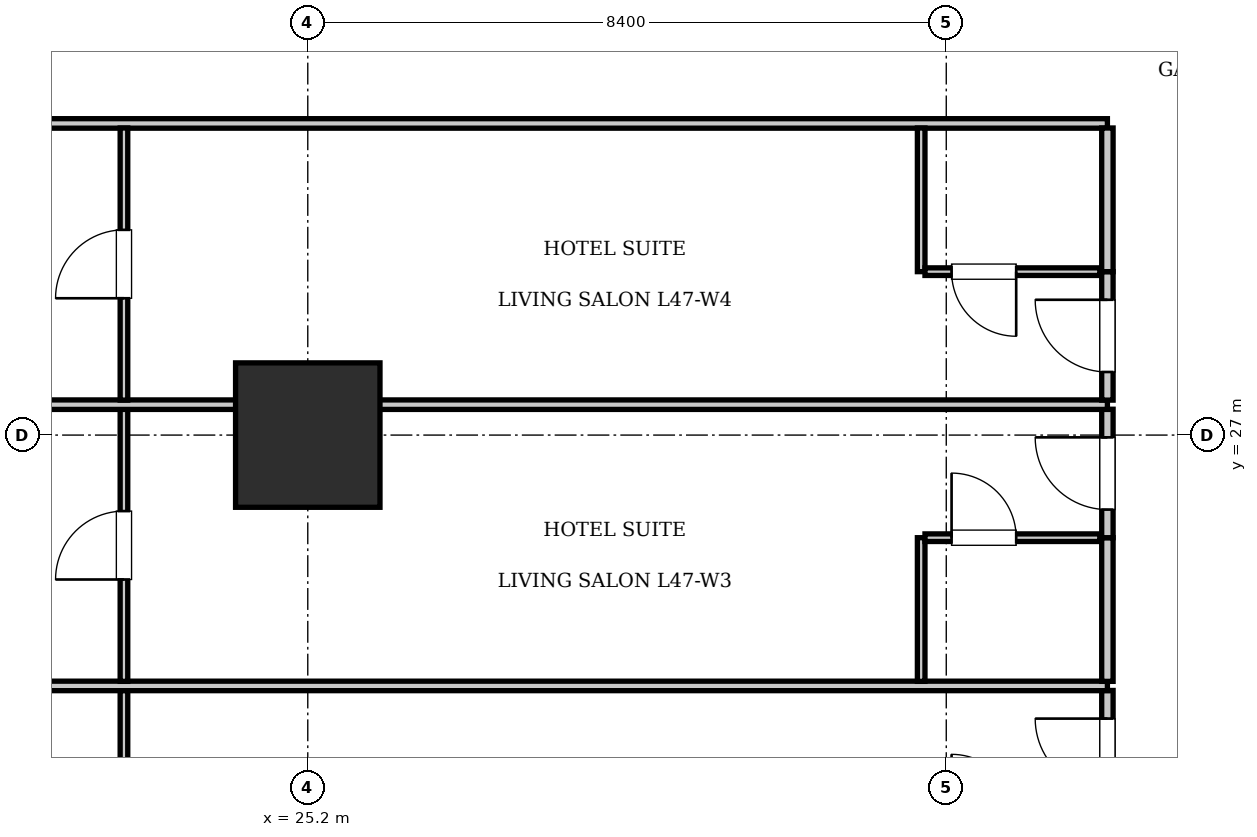
"""IFC4 building model, lengths in metres.
Left out: names, types, materials, properties, quantities, classifications, styles, units other than length and angle.
Written with IfcOpenShell. Run it as: python <this file> out.ifc"""

import sys

from ifc_helpers import new_model, si_unit, direction, frame, frame_2d, origin, origin_2d, place, context, subcontext, project, spatial, rectangle, extrude, element, fill, save


model = new_model("IFC4")
c1 = context("Model", 3, precision=1e-05, world=origin(), true_north=direction((0.0, 1.0)))
c2 = subcontext(c1, "Body", "Model", "MODEL_VIEW")
j1 = project(units=[si_unit("LENGTHUNIT", "METRE"), si_unit("PLANEANGLEUNIT", "RADIAN")], contexts=[c1])
p1 = place(None, origin())
s1 = spatial("IfcSite", under=j1, at=p1, CompositionType="ELEMENT")
p2 = place(p1, origin())
s2 = spatial("IfcBuilding", under=s1, at=p2, CompositionType="ELEMENT")
p3 = place(p2, frame((0.0, 0.0, 192.85)))
s3 = spatial("IfcBuildingStorey", under=s2, at=p3, CompositionType="ELEMENT", Elevation=192.85)
p4 = place(p3, frame((25.2, 27.0, 0.0), z_axis=(0.0, 0.0, 1.0), x_axis=(1.0, 0.0, 0.0)))
e1 = element("IfcColumn", 1, at=p4, inside=s3, PredefinedType="COLUMN", context=c2, shape_type="SweptSolid", body=[
    extrude(rectangle(XDim=1.9, YDim=1.9, at=origin_2d()), origin(), (0.0, 0.0, 1.0), 3.85),
])
p5 = place(p3, frame((13.2, 31.1, 0.0), z_axis=(0.0, 0.0, 1.0), x_axis=(1.0, 0.0, 0.0)))
e2 = element("IfcWall", 2, at=p5, inside=s3, PredefinedType="PARTITIONING", context=c2, shape_type="SweptSolid", body=[
    extrude(rectangle(XDim=22.52, YDim=0.125, at=frame_2d((11.26, 0.0))), origin(), (0.0, 0.0, 1.0), 3.61),
])
p6 = place(p3, frame((35.72, 21.95, 0.0), z_axis=(0.0, 0.0, 1.0), x_axis=(0.0, 1.0, 0.0)))
e3 = element("IfcWall", 3, at=p6, inside=s3, PredefinedType="PARTITIONING", context=c2, shape_type="SweptSolid", body=[
    extrude(rectangle(XDim=1.69, YDim=0.15, at=frame_2d((0.845, 0.0))), origin(), (0.0, 0.0, 1.0), 3.61),
])
p7 = place(p6, frame((0.37, 0.0, 0.0)))
e4 = element("IfcOpeningElement", 4, at=p7, cuts=e3, PredefinedType="OPENING", context=c2, shape_type="SweptSolid", body=[
    extrude(rectangle(XDim=0.95, YDim=2.15, at=frame_2d((0.475, 1.075))), frame((0.0, 0.085, 0.0), z_axis=(0.0, -1.0, 0.0), x_axis=(1.0, 0.0, 0.0)), (0.0, 0.0, 1.0), 0.17),
])
p8 = place(p3, frame((22.781, 20.06, 0.0), z_axis=(0.0, 0.0, 1.0), x_axis=(0.0, 1.0, 0.0)))
e5 = element("IfcWall", 5, at=p8, inside=s3, PredefinedType="PARTITIONING", context=c2, shape_type="SweptSolid", body=[
    extrude(rectangle(XDim=3.58, YDim=0.1, at=frame_2d((1.79, 0.0))), origin(), (0.0, 0.0, 1.0), 3.61),
])
p9 = place(p8, frame((1.34, 0.0, 0.0)))
e6 = element("IfcOpeningElement", 6, at=p9, cuts=e5, PredefinedType="OPENING", context=c2, shape_type="SweptSolid", body=[
    extrude(rectangle(XDim=0.9, YDim=2.1, at=frame_2d((0.45, 1.05))), frame((0.0, 0.06, 0.0), z_axis=(0.0, -1.0, 0.0), x_axis=(1.0, 0.0, 0.0)), (0.0, 0.0, 1.0), 0.12),
])
p10 = place(p3, frame((13.2, 23.7, 0.0), z_axis=(0.0, 0.0, 1.0), x_axis=(1.0, 0.0, 0.0)))
e7 = element("IfcWall", 7, at=p10, inside=s3, PredefinedType="PARTITIONING", context=c2, shape_type="SweptSolid", body=[
    extrude(rectangle(XDim=22.52, YDim=0.125, at=frame_2d((11.26, 0.0))), origin(), (0.0, 0.0, 1.0), 3.61),
])
p11 = place(p3, frame((35.72, 23.76, 0.0), z_axis=(0.0, 0.0, 1.0), x_axis=(0.0, 1.0, 0.0)))
e8 = element("IfcWall", 8, at=p11, inside=s3, PredefinedType="PARTITIONING", context=c2, shape_type="SweptSolid", body=[
    extrude(rectangle(XDim=1.89, YDim=0.15, at=frame_2d((0.945, 0.0))), origin(), (0.0, 0.0, 1.0), 3.61),
])
p12 = place(p3, frame((35.72, 25.65, 0.0), z_axis=(0.0, 0.0, 1.0), x_axis=(0.0, 1.0, 0.0)))
e9 = element("IfcWall", 9, at=p12, inside=s3, PredefinedType="PARTITIONING", context=c2, shape_type="SweptSolid", body=[
    extrude(rectangle(XDim=1.69, YDim=0.15, at=frame_2d((0.845, 0.0))), origin(), (0.0, 0.0, 1.0), 3.61),
])
p13 = place(p12, frame((0.37, 0.0, 0.0)))
e10 = element("IfcOpeningElement", 10, at=p13, cuts=e9, PredefinedType="OPENING", context=c2, shape_type="SweptSolid", body=[
    extrude(rectangle(XDim=0.95, YDim=2.15, at=frame_2d((0.475, 1.075))), frame((0.0, 0.085, 0.0), z_axis=(0.0, -1.0, 0.0), x_axis=(1.0, 0.0, 0.0)), (0.0, 0.0, 1.0), 0.17),
])
p14 = place(p3, frame((33.27, 23.76, 0.0), z_axis=(0.0, 0.0, 1.0), x_axis=(0.0, 1.0, 0.0)))
e11 = element("IfcWall", 11, at=p14, inside=s3, PredefinedType="PARTITIONING", context=c2, shape_type="SweptSolid", body=[
    extrude(rectangle(XDim=1.89, YDim=0.1, at=frame_2d((0.945, 0.0))), origin(), (0.0, 0.0, 1.0), 3.61),
])
p15 = place(p3, frame((33.32, 25.65, 0.0), z_axis=(0.0, 0.0, 1.0), x_axis=(1.0, 0.0, 0.0)))
e12 = element("IfcWall", 12, at=p15, inside=s3, PredefinedType="PARTITIONING", context=c2, shape_type="SweptSolid", body=[
    extrude(rectangle(XDim=2.3, YDim=0.1, at=frame_2d((1.15, 0.0))), origin(), (0.0, 0.0, 1.0), 3.61),
])
p16 = place(p15, frame((0.35, 0.0, 0.0)))
e13 = element("IfcOpeningElement", 13, at=p16, cuts=e12, PredefinedType="OPENING", context=c2, shape_type="SweptSolid", body=[
    extrude(rectangle(XDim=0.85, YDim=2.1, at=frame_2d((0.425, 1.05))), frame((0.0, 0.06, 0.0), z_axis=(0.0, -1.0, 0.0), x_axis=(1.0, 0.0, 0.0)), (0.0, 0.0, 1.0), 0.12),
])
p17 = place(p3, frame((22.781, 23.76, 0.0), z_axis=(0.0, 0.0, 1.0), x_axis=(0.0, 1.0, 0.0)))
e14 = element("IfcWall", 14, at=p17, inside=s3, PredefinedType="PARTITIONING", context=c2, shape_type="SweptSolid", body=[
    extrude(rectangle(XDim=3.58, YDim=0.1, at=frame_2d((1.79, 0.0))), origin(), (0.0, 0.0, 1.0), 3.61),
])
p18 = place(p17, frame((1.34, 0.0, 0.0)))
e15 = element("IfcOpeningElement", 15, at=p18, cuts=e14, PredefinedType="OPENING", context=c2, shape_type="SweptSolid", body=[
    extrude(rectangle(XDim=0.9, YDim=2.1, at=frame_2d((0.45, 1.05))), frame((0.0, 0.06, 0.0), z_axis=(0.0, -1.0, 0.0), x_axis=(1.0, 0.0, 0.0)), (0.0, 0.0, 1.0), 0.12),
])
p19 = place(p3, frame((13.2, 27.4, 0.0), z_axis=(0.0, 0.0, 1.0), x_axis=(1.0, 0.0, 0.0)))
e16 = element("IfcWall", 16, at=p19, inside=s3, PredefinedType="PARTITIONING", context=c2, shape_type="SweptSolid", body=[
    extrude(rectangle(XDim=22.52, YDim=0.125, at=frame_2d((11.26, 0.0))), origin(), (0.0, 0.0, 1.0), 3.61),
])
p20 = place(p3, frame((35.72, 27.46, 0.0), z_axis=(0.0, 0.0, 1.0), x_axis=(0.0, 1.0, 0.0)))
e17 = element("IfcWall", 17, at=p20, inside=s3, PredefinedType="PARTITIONING", context=c2, shape_type="SweptSolid", body=[
    extrude(rectangle(XDim=1.69, YDim=0.15, at=frame_2d((0.845, 0.0))), origin(), (0.0, 0.0, 1.0), 3.61),
])
p21 = place(p20, frame((0.37, 0.0, 0.0)))
e18 = element("IfcOpeningElement", 18, at=p21, cuts=e17, PredefinedType="OPENING", context=c2, shape_type="SweptSolid", body=[
    extrude(rectangle(XDim=0.95, YDim=2.15, at=frame_2d((0.475, 1.075))), frame((0.0, 0.085, 0.0), z_axis=(0.0, -1.0, 0.0), x_axis=(1.0, 0.0, 0.0)), (0.0, 0.0, 1.0), 0.17),
])
p22 = place(p3, frame((35.72, 29.15, 0.0), z_axis=(0.0, 0.0, 1.0), x_axis=(0.0, 1.0, 0.0)))
e19 = element("IfcWall", 19, at=p22, inside=s3, PredefinedType="PARTITIONING", context=c2, shape_type="SweptSolid", body=[
    extrude(rectangle(XDim=1.89, YDim=0.15, at=frame_2d((0.945, 0.0))), origin(), (0.0, 0.0, 1.0), 3.61),
])
p23 = place(p3, frame((33.27, 29.15, 0.0), z_axis=(0.0, 0.0, 1.0), x_axis=(0.0, 1.0, 0.0)))
e20 = element("IfcWall", 20, at=p23, inside=s3, PredefinedType="PARTITIONING", context=c2, shape_type="SweptSolid", body=[
    extrude(rectangle(XDim=1.89, YDim=0.1, at=frame_2d((0.945, 0.0))), origin(), (0.0, 0.0, 1.0), 3.61),
])
p24 = place(p3, frame((33.32, 29.15, 0.0), z_axis=(0.0, 0.0, 1.0), x_axis=(1.0, 0.0, 0.0)))
e21 = element("IfcWall", 21, at=p24, inside=s3, PredefinedType="PARTITIONING", context=c2, shape_type="SweptSolid", body=[
    extrude(rectangle(XDim=2.3, YDim=0.1, at=frame_2d((1.15, 0.0))), origin(), (0.0, 0.0, 1.0), 3.61),
])
p25 = place(p24, frame((0.35, 0.0, 0.0)))
e22 = element("IfcOpeningElement", 22, at=p25, cuts=e21, PredefinedType="OPENING", context=c2, shape_type="SweptSolid", body=[
    extrude(rectangle(XDim=0.85, YDim=2.1, at=frame_2d((0.425, 1.05))), frame((0.0, 0.06, 0.0), z_axis=(0.0, -1.0, 0.0), x_axis=(1.0, 0.0, 0.0)), (0.0, 0.0, 1.0), 0.12),
])
p26 = place(p3, frame((22.781, 27.46, 0.0), z_axis=(0.0, 0.0, 1.0), x_axis=(0.0, 1.0, 0.0)))
e23 = element("IfcWall", 23, at=p26, inside=s3, PredefinedType="PARTITIONING", context=c2, shape_type="SweptSolid", body=[
    extrude(rectangle(XDim=3.58, YDim=0.1, at=frame_2d((1.79, 0.0))), origin(), (0.0, 0.0, 1.0), 3.61),
])
p27 = place(p26, frame((1.34, 0.0, 0.0)))
e24 = element("IfcOpeningElement", 24, at=p27, cuts=e23, PredefinedType="OPENING", context=c2, shape_type="SweptSolid", body=[
    extrude(rectangle(XDim=0.9, YDim=2.1, at=frame_2d((0.45, 1.05))), frame((0.0, 0.06, 0.0), z_axis=(0.0, -1.0, 0.0), x_axis=(1.0, 0.0, 0.0)), (0.0, 0.0, 1.0), 0.12),
])
p28 = place(p7, origin())
e25 = element("IfcDoor", 25, at=p28, inside=s3, OperationType="SINGLE_SWING_RIGHT", PredefinedType="DOOR", context=c2, shape_type="SweptSolid", body=[
    extrude(rectangle(XDim=0.95, YDim=2.15, at=frame_2d((0.475, 1.075))), frame((0.0, 0.025, 0.0), z_axis=(0.0, -1.0, 0.0), x_axis=(1.0, 0.0, 0.0)), (0.0, 0.0, 1.0), 0.05),
])
fill(e4, e25)
p29 = place(p16, origin())
e26 = element("IfcDoor", 26, at=p29, inside=s3, OperationType="SINGLE_SWING_LEFT", PredefinedType="DOOR", context=c2, shape_type="SweptSolid", body=[
    extrude(rectangle(XDim=0.85, YDim=2.1, at=frame_2d((0.425, 1.05))), frame((0.0, 0.025, 0.0), z_axis=(0.0, -1.0, 0.0), x_axis=(1.0, 0.0, 0.0)), (0.0, 0.0, 1.0), 0.05),
])
fill(e13, e26)
p30 = place(p13, origin())
e27 = element("IfcDoor", 27, at=p30, inside=s3, OperationType="SINGLE_SWING_RIGHT", PredefinedType="DOOR", context=c2, shape_type="SweptSolid", body=[
    extrude(rectangle(XDim=0.95, YDim=2.15, at=frame_2d((0.475, 1.075))), frame((0.0, 0.025, 0.0), z_axis=(0.0, -1.0, 0.0), x_axis=(1.0, 0.0, 0.0)), (0.0, 0.0, 1.0), 0.05),
])
fill(e10, e27)
p31 = place(p18, origin())
e28 = element("IfcDoor", 28, at=p31, inside=s3, OperationType="SINGLE_SWING_LEFT", PredefinedType="DOOR", context=c2, shape_type="SweptSolid", body=[
    extrude(rectangle(XDim=0.9, YDim=2.1, at=frame_2d((0.45, 1.05))), frame((0.0, 0.025, 0.0), z_axis=(0.0, -1.0, 0.0), x_axis=(1.0, 0.0, 0.0)), (0.0, 0.0, 1.0), 0.05),
])
fill(e15, e28)
p32 = place(p25, frame((0.85, 0.0, 0.0), z_axis=(0.0, 0.0, 1.0), x_axis=(-1.0, 0.0, 0.0)))
e29 = element("IfcDoor", 29, at=p32, inside=s3, OperationType="SINGLE_SWING_LEFT", PredefinedType="DOOR", context=c2, shape_type="SweptSolid", body=[
    extrude(rectangle(XDim=0.85, YDim=2.1, at=frame_2d((0.425, 1.05))), frame((0.0, 0.025, 0.0), z_axis=(0.0, -1.0, 0.0), x_axis=(1.0, 0.0, 0.0)), (0.0, 0.0, 1.0), 0.05),
])
fill(e22, e29)
p33 = place(p21, origin())
e30 = element("IfcDoor", 30, at=p33, inside=s3, OperationType="SINGLE_SWING_RIGHT", PredefinedType="DOOR", context=c2, shape_type="SweptSolid", body=[
    extrude(rectangle(XDim=0.95, YDim=2.15, at=frame_2d((0.475, 1.075))), frame((0.0, 0.025, 0.0), z_axis=(0.0, -1.0, 0.0), x_axis=(1.0, 0.0, 0.0)), (0.0, 0.0, 1.0), 0.05),
])
fill(e18, e30)
p34 = place(p27, origin())
e31 = element("IfcDoor", 31, at=p34, inside=s3, OperationType="SINGLE_SWING_LEFT", PredefinedType="DOOR", context=c2, shape_type="SweptSolid", body=[
    extrude(rectangle(XDim=0.9, YDim=2.1, at=frame_2d((0.45, 1.05))), frame((0.0, 0.025, 0.0), z_axis=(0.0, -1.0, 0.0), x_axis=(1.0, 0.0, 0.0)), (0.0, 0.0, 1.0), 0.05),
])
fill(e24, e31)
save(model, sys.argv[1])
